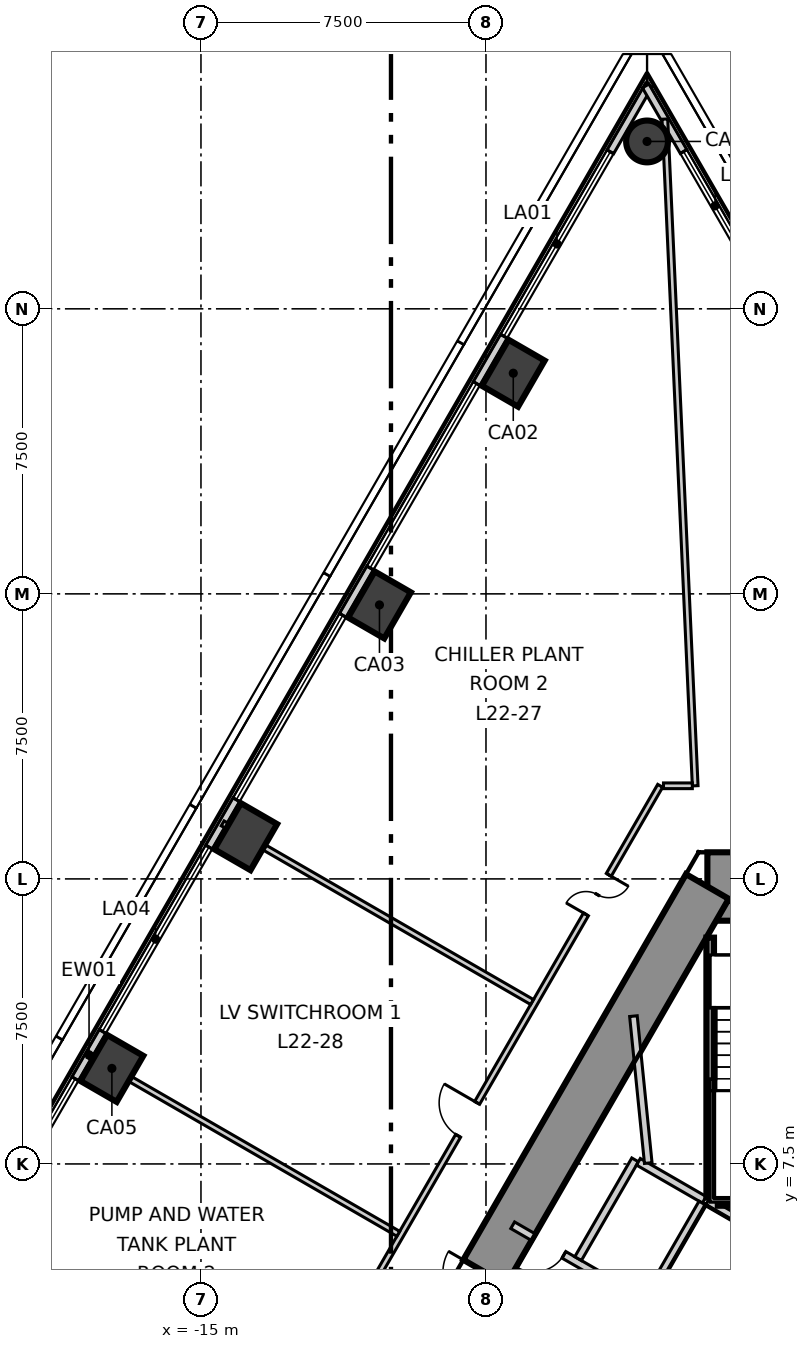
"""IFC4 building model, lengths in metres.
Left out: names, types, materials, properties, quantities, classifications, styles, units other than length and angle.
Written with IfcOpenShell. Run it as: python <this file> out.ifc"""

import sys

from ifc_helpers import new_model, si_unit, direction, frame, frame_2d, origin, origin_2d, place, context, subcontext, project, spatial, polyline, rectangle, circle, outline, extrude, element, fill, save


model = new_model("IFC4")
c1 = context("Model", 3, precision=1e-05, world=origin(), true_north=direction((0.0, 1.0)))
c2 = subcontext(c1, "Body", "Model", "MODEL_VIEW")
j1 = project(units=[si_unit("LENGTHUNIT", "METRE"), si_unit("PLANEANGLEUNIT", "RADIAN")], contexts=[c1])
p1 = place(None, origin())
s1 = spatial("IfcSite", under=j1, at=p1, CompositionType="ELEMENT")
p2 = place(p1, origin())
s2 = spatial("IfcBuilding", under=s1, at=p2, CompositionType="ELEMENT")
p3 = place(p2, frame((0.0, 0.0, 99.8)))
s3 = spatial("IfcBuildingStorey", under=s2, at=p3, CompositionType="ELEMENT", Elevation=99.8)
p4 = place(p3, frame((1.674, 14.8, -0.6), z_axis=(0.0, 0.0, 1.0), x_axis=(-1.0, 0.0, 0.0)))
e1 = element("IfcWall", 1, at=p4, inside=s3, PredefinedType="SHEAR", context=c2, shape_type="SweptSolid", body=[
    extrude(outline(polyline([(-0.231, -0.9), (1.674, -0.9), (3.579, -0.9), (3.117, 0.9), (1.674, 0.9), (0.231, 0.9), (-0.231, -0.9)])), origin(), (0.0, 0.0, 1.0), 4.8),
])
p5 = place(p4, frame((1.133, 0.0, 0.6)))
e2 = element("IfcOpeningElement", 2, at=p5, cuts=e1, PredefinedType="OPENING", context=c2, shape_type="SweptSolid", body=[
    extrude(rectangle(XDim=1.4, YDim=2.1, at=frame_2d((0.7, 1.05))), frame((0.0, 0.91, 0.0), z_axis=(0.0, -1.0, 0.0), x_axis=(1.0, 0.0, 0.0)), (0.0, 0.0, 1.0), 1.82),
])
p6 = place(p3, frame((-1.674, 14.8, -0.6), z_axis=(0.0, 0.0, 1.0), x_axis=(-0.499998822509, -0.866026083608, 0.0)))
e3 = element("IfcWall", 3, at=p6, inside=s3, PredefinedType="SHEAR", context=c2, shape_type="SweptSolid", body=[
    extrude(outline(polyline([(-0.664, -0.65), (1.281, -0.65), (3.226, -0.65), (5.172, -0.65), (7.117, -0.65), (9.062, -0.65), (11.007, -0.65), (12.953, -0.65), (14.898, -0.65), (16.843, -0.65), (18.788, -0.65), (20.734, -0.65), (22.679, -0.65), (24.624, -0.65), (23.296, 0.65), (21.41, 0.65), (19.524, 0.65), (17.638, 0.65), (15.752, 0.65), (13.866, 0.65), (11.98, 0.65), (10.094, 0.65), (8.208, 0.65), (6.322, 0.65), (4.436, 0.65), (2.55, 0.65), (0.664, 0.65), (-0.664, -0.65)])), origin(), (0.0, 0.0, 1.0), 4.8),
])
p7 = place(p6, frame((11.719, 0.0, 0.6)))
e4 = element("IfcOpeningElement", 4, at=p7, cuts=e3, PredefinedType="OPENING", context=c2, shape_type="SweptSolid", body=[
    extrude(rectangle(XDim=1.1, YDim=2.1, at=frame_2d((0.55, 1.05))), frame((0.0, 0.66, 0.0), z_axis=(0.0, -1.0, 0.0), x_axis=(1.0, 0.0, 0.0)), (0.0, 0.0, 1.0), 1.32),
])
p8 = place(p3, frame((-3.262, 34.404, -0.6), z_axis=(0.0, 0.0, 1.0), x_axis=(0.5, 0.866025403784, 0.0)))
e5 = element("IfcColumn", 5, at=p8, inside=s3, PredefinedType="COLUMN", context=c2, shape_type="SweptSolid", body=[
    extrude(circle(Radius=0.55, at=origin_2d()), origin(), (0.0, 0.0, 1.0), 4.8),
])
for number, where, z_axis, x_axis in (
    (6, (-6.782, 28.306, -0.6), (0.0, 0.0, 1.0), (0.5, 0.866, 0.0)),
    (7, (-10.303, 22.209, -0.6), (0.0, 0.0, 1.0), (0.5, 0.866, 0.0)),
    (8, (-13.823, 16.111, -0.6), (0.0, 0.0, 1.0), (0.5, 0.866, 0.0)),
    (9, (-17.344, 10.014, -0.6), (0.0, 0.0, 1.0), (0.5, 0.866, 0.0)),
):
    element("IfcColumn", number, at=place(p3, frame(where, z_axis=z_axis, x_axis=x_axis)), inside=s3, PredefinedType="COLUMN", context=c2, shape_type="SweptSolid", body=[
        extrude(rectangle(XDim=1.4, YDim=1.1, at=origin_2d()), origin(), (0.0, 0.0, 1.0), 4.8),
    ])
p9 = place(p3, frame((-3.217, 35.882, 0.0), z_axis=(0.0, 0.0, 1.0), x_axis=(-0.499995323711, -0.866028103624, 0.0)))
e10 = element("IfcWall", 10, at=p9, inside=s3, PredefinedType="ELEMENTEDWALL", context=c2, shape_type="SweptSolid", body=[
    extrude(rectangle(XDim=58.913, YDim=0.2, at=frame_2d((29.456, 0.0))), origin(), (0.0, 0.0, 1.0), 4.2),
])
p10 = place(p9, frame((2.023, 0.0, 0.6)))
e11 = element("IfcOpeningElement", 11, at=p10, cuts=e10, PredefinedType="OPENING", context=c2, shape_type="SweptSolid", body=[
    extrude(rectangle(XDim=5.6, YDim=3.0, at=frame_2d((2.8, 1.5))), frame((0.0, 0.11, 0.0), z_axis=(0.0, -1.0, 0.0), x_axis=(1.0, 0.0, 0.0)), (0.0, 0.0, 1.0), 0.22),
])
p11 = place(p9, frame((9.064, 0.0, 0.6)))
e12 = element("IfcOpeningElement", 12, at=p11, cuts=e10, PredefinedType="OPENING", context=c2, shape_type="SweptSolid", body=[
    extrude(rectangle(XDim=5.6, YDim=3.0, at=frame_2d((2.8, 1.5))), frame((0.0, 0.11, 0.0), z_axis=(0.0, -1.0, 0.0), x_axis=(1.0, 0.0, 0.0)), (0.0, 0.0, 1.0), 0.22),
])
p12 = place(p9, frame((16.105, 0.0, 0.6)))
e13 = element("IfcOpeningElement", 13, at=p12, cuts=e10, PredefinedType="OPENING", context=c2, shape_type="SweptSolid", body=[
    extrude(rectangle(XDim=5.6, YDim=3.0, at=frame_2d((2.8, 1.5))), frame((0.0, 0.11, 0.0), z_axis=(0.0, -1.0, 0.0), x_axis=(1.0, 0.0, 0.0)), (0.0, 0.0, 1.0), 0.22),
])
p13 = place(p9, frame((23.146, 0.0, 0.6)))
e14 = element("IfcOpeningElement", 14, at=p13, cuts=e10, PredefinedType="OPENING", context=c2, shape_type="SweptSolid", body=[
    extrude(rectangle(XDim=5.6, YDim=3.0, at=frame_2d((2.8, 1.5))), frame((0.0, 0.11, 0.0), z_axis=(0.0, -1.0, 0.0), x_axis=(1.0, 0.0, 0.0)), (0.0, 0.0, 1.0), 0.22),
])
p14 = place(p9, frame((30.186, 0.0, 0.6)))
e15 = element("IfcOpeningElement", 15, at=p14, cuts=e10, PredefinedType="OPENING", context=c2, shape_type="SweptSolid", body=[
    extrude(rectangle(XDim=5.6, YDim=3.0, at=frame_2d((2.8, 1.5))), frame((0.0, 0.11, 0.0), z_axis=(0.0, -1.0, 0.0), x_axis=(1.0, 0.0, 0.0)), (0.0, 0.0, 1.0), 0.22),
])
p15 = place(p9, frame((37.227, 0.0, 0.6)))
e16 = element("IfcOpeningElement", 16, at=p15, cuts=e10, PredefinedType="OPENING", context=c2, shape_type="SweptSolid", body=[
    extrude(rectangle(XDim=5.6, YDim=3.0, at=frame_2d((2.8, 1.5))), frame((0.0, 0.11, 0.0), z_axis=(0.0, -1.0, 0.0), x_axis=(1.0, 0.0, 0.0)), (0.0, 0.0, 1.0), 0.22),
])
p16 = place(p9, frame((44.268, 0.0, 0.6)))
e17 = element("IfcOpeningElement", 17, at=p16, cuts=e10, PredefinedType="OPENING", context=c2, shape_type="SweptSolid", body=[
    extrude(rectangle(XDim=5.6, YDim=3.0, at=frame_2d((2.8, 1.5))), frame((0.0, 0.11, 0.0), z_axis=(0.0, -1.0, 0.0), x_axis=(1.0, 0.0, 0.0)), (0.0, 0.0, 1.0), 0.22),
])
p17 = place(p9, frame((51.309, 0.0, 0.6)))
e18 = element("IfcOpeningElement", 18, at=p17, cuts=e10, PredefinedType="OPENING", context=c2, shape_type="SweptSolid", body=[
    extrude(rectangle(XDim=5.6, YDim=3.0, at=frame_2d((2.8, 1.5))), frame((0.0, 0.11, 0.0), z_axis=(0.0, -1.0, 0.0), x_axis=(1.0, 0.0, 0.0)), (0.0, 0.0, 1.0), 0.22),
])
p18 = place(p3, frame((0.045, 30.075, 0.0), z_axis=(0.0, 0.0, 1.0), x_axis=(-0.499905806372, 0.866079779671, 0.0)))
e19 = element("IfcWall", 19, at=p18, inside=s3, PredefinedType="ELEMENTEDWALL", context=c2, shape_type="SweptSolid", body=[
    extrude(rectangle(XDim=6.685, YDim=0.2, at=frame_2d((3.343, 0.0))), origin(), (0.0, 0.0, 1.0), 4.2),
])
p19 = place(p18, frame((1.39, 0.0, 0.6)))
e20 = element("IfcOpeningElement", 20, at=p19, cuts=e19, PredefinedType="OPENING", context=c2, shape_type="SweptSolid", body=[
    extrude(rectangle(XDim=3.3, YDim=3.0, at=frame_2d((1.65, 1.5))), frame((0.0, 0.11, 0.0), z_axis=(0.0, -1.0, 0.0), x_axis=(1.0, 0.0, 0.0)), (0.0, 0.0, 1.0), 0.22),
])
p20 = place(p3, frame((-16.57, -6.2, 0.0), z_axis=(0.0, 0.0, 1.0), x_axis=(0.499993827443, 0.866028967483, 0.0)))
e21 = element("IfcWall", 21, at=p20, inside=s3, PredefinedType="PARTITIONING", context=c2, shape_type="SweptSolid", body=[
    extrude(rectangle(XDim=27.308, YDim=0.15, at=frame_2d((13.654, 0.0))), origin(), (0.0, 0.0, 1.0), 4.2),
])
p21 = place(p20, frame((23.402, 0.0, 0.0)))
e22 = element("IfcOpeningElement", 22, at=p21, cuts=e21, PredefinedType="OPENING", context=c2, shape_type="SweptSolid", body=[
    extrude(rectangle(XDim=1.2, YDim=2.1, at=frame_2d((0.6, 1.05))), frame((0.0, 0.085, 0.0), z_axis=(0.0, -1.0, 0.0), x_axis=(1.0, 0.0, 0.0)), (0.0, 0.0, 1.0), 0.17),
])
p22 = place(p20, frame((16.675, 0.0, 0.0)))
e23 = element("IfcOpeningElement", 23, at=p22, cuts=e21, PredefinedType="OPENING", context=c2, shape_type="SweptSolid", body=[
    extrude(rectangle(XDim=1.0, YDim=2.1, at=frame_2d((0.5, 1.05))), frame((0.0, 0.085, 0.0), z_axis=(0.0, -1.0, 0.0), x_axis=(1.0, 0.0, 0.0)), (0.0, 0.0, 1.0), 0.17),
])
p23 = place(p20, frame((9.634, 0.0, 0.0)))
e24 = element("IfcOpeningElement", 24, at=p23, cuts=e21, PredefinedType="OPENING", context=c2, shape_type="SweptSolid", body=[
    extrude(rectangle(XDim=1.0, YDim=2.1, at=frame_2d((0.5, 1.05))), frame((0.0, 0.085, 0.0), z_axis=(0.0, -1.0, 0.0), x_axis=(1.0, 0.0, 0.0)), (0.0, 0.0, 1.0), 0.17),
])
p24 = place(p20, frame((2.707, 0.0, 0.0)))
e25 = element("IfcOpeningElement", 25, at=p24, cuts=e21, PredefinedType="OPENING", context=c2, shape_type="SweptSolid", body=[
    extrude(rectangle(XDim=1.2, YDim=2.1, at=frame_2d((0.6, 1.05))), frame((0.0, 0.085, 0.0), z_axis=(0.0, -1.0, 0.0), x_axis=(1.0, 0.0, 0.0)), (0.0, 0.0, 1.0), 0.17),
])
p25 = place(p3, frame((-17.95, 10.363, 0.0), z_axis=(0.0, 0.0, 1.0), x_axis=(0.866014767649, -0.500018421874, 0.0)))
e26 = element("IfcWall", 26, at=p25, inside=s3, PredefinedType="PARTITIONING", context=c2, shape_type="SweptSolid", body=[
    extrude(rectangle(XDim=9.402, YDim=0.15, at=frame_2d((4.701, 0.0))), origin(), (0.0, 0.0, 1.0), 3.7),
])
p26 = place(p3, frame((-14.429, 16.461, 0.0), z_axis=(0.0, 0.0, 1.0), x_axis=(0.866014767649, -0.500018421874, 0.0)))
e27 = element("IfcWall", 27, at=p26, inside=s3, PredefinedType="PARTITIONING", context=c2, shape_type="SweptSolid", body=[
    extrude(rectangle(XDim=9.402, YDim=0.15, at=frame_2d((4.701, 0.0))), origin(), (0.0, 0.0, 1.0), 4.2),
])
p27 = place(p3, frame((-2.793, 34.992, 0.0), z_axis=(0.0, 0.0, 1.0), x_axis=(0.045435409817, -0.998967278511, 0.0)))
e28 = element("IfcWall", 28, at=p27, inside=s3, PredefinedType="PARTITIONING", context=c2, shape_type="SweptSolid", body=[
    extrude(rectangle(XDim=17.56, YDim=0.15, at=frame_2d((8.78, 0.0))), origin(), (0.0, 0.0, 1.0), 3.4),
])
p28 = place(p3, frame((-2.829, 17.45, 0.0), z_axis=(0.0, 0.0, 1.0), x_axis=(1.0, 0.0, 0.0)))
e29 = element("IfcWall", 29, at=p28, inside=s3, PredefinedType="PARTITIONING", context=c2, shape_type="SweptSolid", body=[
    extrude(rectangle(XDim=0.759, YDim=0.15, at=frame_2d((0.379, 0.0))), origin(), (0.0, 0.0, 1.0), 4.2),
])
p29 = place(p3, frame((-6.797, 5.887, 0.0), z_axis=(0.0, 0.0, 1.0), x_axis=(0.866062584469, -0.499935595635, 0.0)))
e30 = element("IfcWall", 30, at=p29, inside=s3, PredefinedType="SOLIDWALL", context=c2, shape_type="SweptSolid", body=[
    extrude(rectangle(XDim=4.032, YDim=0.2, at=frame_2d((2.016, 0.0))), origin(), (0.0, 0.0, 1.0), 4.2),
])
p30 = place(p29, frame((2.53, 0.0, 0.0)))
e31 = element("IfcOpeningElement", 31, at=p30, cuts=e30, PredefinedType="OPENING", context=c2, shape_type="SweptSolid", body=[
    extrude(rectangle(XDim=0.9, YDim=2.1, at=frame_2d((0.45, 1.05))), frame((0.0, 0.11, 0.0), z_axis=(0.0, -1.0, 0.0), x_axis=(1.0, 0.0, 0.0)), (0.0, 0.0, 1.0), 0.22),
])
p31 = place(p29, frame((0.655, 0.0, 0.0)))
e32 = element("IfcOpeningElement", 32, at=p31, cuts=e30, PredefinedType="OPENING", context=c2, shape_type="SweptSolid", body=[
    extrude(rectangle(XDim=0.9, YDim=2.1, at=frame_2d((0.45, 1.05))), frame((0.0, 0.11, 0.0), z_axis=(0.0, -1.0, 0.0), x_axis=(1.0, 0.0, 0.0)), (0.0, 0.0, 1.0), 0.22),
])
p32 = place(p3, frame((-5.076, 5.009, 0.0), z_axis=(0.0, 0.0, 1.0), x_axis=(0.50002537861, 0.866010750942, 0.0)))
e33 = element("IfcWall", 33, at=p32, inside=s3, PredefinedType="SOLIDWALL", context=c2, shape_type="SweptSolid", body=[
    extrude(rectangle(XDim=3.0, YDim=0.2, at=frame_2d((1.5, 0.0))), origin(), (0.0, 0.0, 1.0), 4.2),
])
p33 = place(p3, frame((-3.489, 7.557, 0.0), z_axis=(0.0, 0.0, 1.0), x_axis=(0.866010750942, -0.50002537861, 0.0)))
e34 = element("IfcWall", 34, at=p33, inside=s3, PredefinedType="SOLIDWALL", context=c2, shape_type="SweptSolid", body=[
    extrude(rectangle(XDim=2.0, YDim=0.2, at=frame_2d((1.0, 0.0))), origin(), (0.0, 0.0, 1.0), 4.2),
])
p34 = place(p3, frame((-3.257, 3.959, 0.0), z_axis=(0.0, 0.0, 1.0), x_axis=(0.50012328804, 0.865954211699, 0.0)))
e35 = element("IfcWall", 35, at=p34, inside=s3, PredefinedType="SOLIDWALL", context=c2, shape_type="SweptSolid", body=[
    extrude(rectangle(XDim=2.9, YDim=0.2, at=frame_2d((1.45, 0.0))), origin(), (0.0, 0.0, 1.0), 4.2),
])
p35 = place(p3, frame((-1.67, 6.507, 0.0), z_axis=(0.0, 0.0, 1.0), x_axis=(0.865941441609, -0.500145398563, 0.0)))
e36 = element("IfcWall", 36, at=p35, inside=s3, PredefinedType="SOLIDWALL", context=c2, shape_type="SweptSolid", body=[
    extrude(rectangle(XDim=1.815, YDim=0.2, at=frame_2d((0.908, 0.0))), origin(), (0.0, 0.0, 1.0), 4.2),
])
p36 = place(p3, frame((-1.438, 2.909, 0.0), z_axis=(0.0, 0.0, 1.0), x_axis=(0.499829630636, 0.866123744241, 0.0)))
e37 = element("IfcWall", 37, at=p36, inside=s3, PredefinedType="SOLIDWALL", context=c2, shape_type="SweptSolid", body=[
    extrude(rectangle(XDim=2.761, YDim=0.2, at=frame_2d((1.38, 0.0))), origin(), (0.0, 0.0, 1.0), 4.2),
])
p37 = place(p3, frame((-3.62, 11.389, 0.0), z_axis=(0.0, 0.0, 1.0), x_axis=(0.100405723382, -0.994946576813, 0.0)))
e38 = element("IfcWall", 38, at=p37, inside=s3, PredefinedType="SOLIDWALL", context=c2, shape_type="SweptSolid", body=[
    extrude(rectangle(XDim=3.885, YDim=0.2, at=frame_2d((1.943, 0.0))), origin(), (0.0, 0.0, 1.0), 4.2),
])
p38 = place(p3, frame((-1.4, 6.5, 0.0), z_axis=(0.0, 0.0, 1.0), x_axis=(1.0, 0.0, 0.0)))
e39 = element("IfcWall", 39, at=p38, inside=s3, PredefinedType="SOLIDWALL", context=c2, shape_type="SweptSolid", body=[
    extrude(rectangle(XDim=2.8, YDim=0.2, at=frame_2d((1.4, 0.0))), origin(), (0.0, 0.0, 1.0), 4.2),
])
p39 = place(p3, frame((-1.6, 6.615, 0.0), z_axis=(0.0, 0.0, 1.0), x_axis=(0.0, 1.0, 0.0)))
e40 = element("IfcWall", 40, at=p39, inside=s3, PredefinedType="SOLIDWALL", context=c2, shape_type="SweptSolid", body=[
    extrude(rectangle(XDim=6.84, YDim=0.2, at=frame_2d((3.42, 0.0))), origin(), (0.0, 0.0, 1.0), 4.2),
])
p40 = place(p10, origin())
e41 = element("IfcWindow", 41, at=p40, inside=s3, PartitioningType="SINGLE_PANEL", PredefinedType="WINDOW", context=c2, shape_type="SweptSolid", body=[
    extrude(rectangle(XDim=5.6, YDim=3.0, at=frame_2d((2.8, 1.5))), frame((0.0, 0.03, 0.0), z_axis=(0.0, -1.0, 0.0), x_axis=(1.0, 0.0, 0.0)), (0.0, 0.0, 1.0), 0.06),
])
fill(e11, e41)
p41 = place(p11, origin())
e42 = element("IfcWindow", 42, at=p41, inside=s3, PartitioningType="SINGLE_PANEL", PredefinedType="WINDOW", context=c2, shape_type="SweptSolid", body=[
    extrude(rectangle(XDim=5.6, YDim=3.0, at=frame_2d((2.8, 1.5))), frame((0.0, 0.03, 0.0), z_axis=(0.0, -1.0, 0.0), x_axis=(1.0, 0.0, 0.0)), (0.0, 0.0, 1.0), 0.06),
])
fill(e12, e42)
p42 = place(p12, origin())
e43 = element("IfcWindow", 43, at=p42, inside=s3, PartitioningType="SINGLE_PANEL", PredefinedType="WINDOW", context=c2, shape_type="SweptSolid", body=[
    extrude(rectangle(XDim=5.6, YDim=3.0, at=frame_2d((2.8, 1.5))), frame((0.0, 0.03, 0.0), z_axis=(0.0, -1.0, 0.0), x_axis=(1.0, 0.0, 0.0)), (0.0, 0.0, 1.0), 0.06),
])
fill(e13, e43)
p43 = place(p13, origin())
e44 = element("IfcWindow", 44, at=p43, inside=s3, PartitioningType="SINGLE_PANEL", PredefinedType="WINDOW", context=c2, shape_type="SweptSolid", body=[
    extrude(rectangle(XDim=5.6, YDim=3.0, at=frame_2d((2.8, 1.5))), frame((0.0, 0.03, 0.0), z_axis=(0.0, -1.0, 0.0), x_axis=(1.0, 0.0, 0.0)), (0.0, 0.0, 1.0), 0.06),
])
fill(e14, e44)
p44 = place(p14, origin())
e45 = element("IfcWindow", 45, at=p44, inside=s3, PartitioningType="SINGLE_PANEL", PredefinedType="WINDOW", context=c2, shape_type="SweptSolid", body=[
    extrude(rectangle(XDim=5.6, YDim=3.0, at=frame_2d((2.8, 1.5))), frame((0.0, 0.03, 0.0), z_axis=(0.0, -1.0, 0.0), x_axis=(1.0, 0.0, 0.0)), (0.0, 0.0, 1.0), 0.06),
])
fill(e15, e45)
p45 = place(p19, origin())
e46 = element("IfcWindow", 46, at=p45, inside=s3, PartitioningType="SINGLE_PANEL", PredefinedType="WINDOW", context=c2, shape_type="SweptSolid", body=[
    extrude(rectangle(XDim=3.3, YDim=3.0, at=frame_2d((1.65, 1.5))), frame((0.0, 0.03, 0.0), z_axis=(0.0, -1.0, 0.0), x_axis=(1.0, 0.0, 0.0)), (0.0, 0.0, 1.0), 0.06),
])
fill(e20, e46)
p46 = place(p21, origin())
e47 = element("IfcDoor", 47, at=p46, inside=s3, OperationType="DOUBLE_DOOR_SINGLE_SWING", PredefinedType="DOOR", context=c2, shape_type="SweptSolid", body=[
    extrude(rectangle(XDim=1.2, YDim=2.1, at=frame_2d((0.6, 1.05))), frame((0.0, 0.025, 0.0), z_axis=(0.0, -1.0, 0.0), x_axis=(1.0, 0.0, 0.0)), (0.0, 0.0, 1.0), 0.05),
])
fill(e22, e47)
p47 = place(p22, origin())
e48 = element("IfcDoor", 48, at=p47, inside=s3, OperationType="SINGLE_SWING_LEFT", PredefinedType="DOOR", context=c2, shape_type="SweptSolid", body=[
    extrude(rectangle(XDim=1.0, YDim=2.1, at=frame_2d((0.5, 1.05))), frame((0.0, 0.025, 0.0), z_axis=(0.0, -1.0, 0.0), x_axis=(1.0, 0.0, 0.0)), (0.0, 0.0, 1.0), 0.05),
])
fill(e23, e48)
p48 = place(p31, origin())
e49 = element("IfcDoor", 49, at=p48, inside=s3, OperationType="SINGLE_SWING_LEFT", PredefinedType="DOOR", context=c2, shape_type="SweptSolid", body=[
    extrude(rectangle(XDim=0.9, YDim=2.1, at=frame_2d((0.45, 1.05))), frame((0.0, 0.025, 0.0), z_axis=(0.0, -1.0, 0.0), x_axis=(1.0, 0.0, 0.0)), (0.0, 0.0, 1.0), 0.05),
])
fill(e32, e49)
save(model, sys.argv[1])
